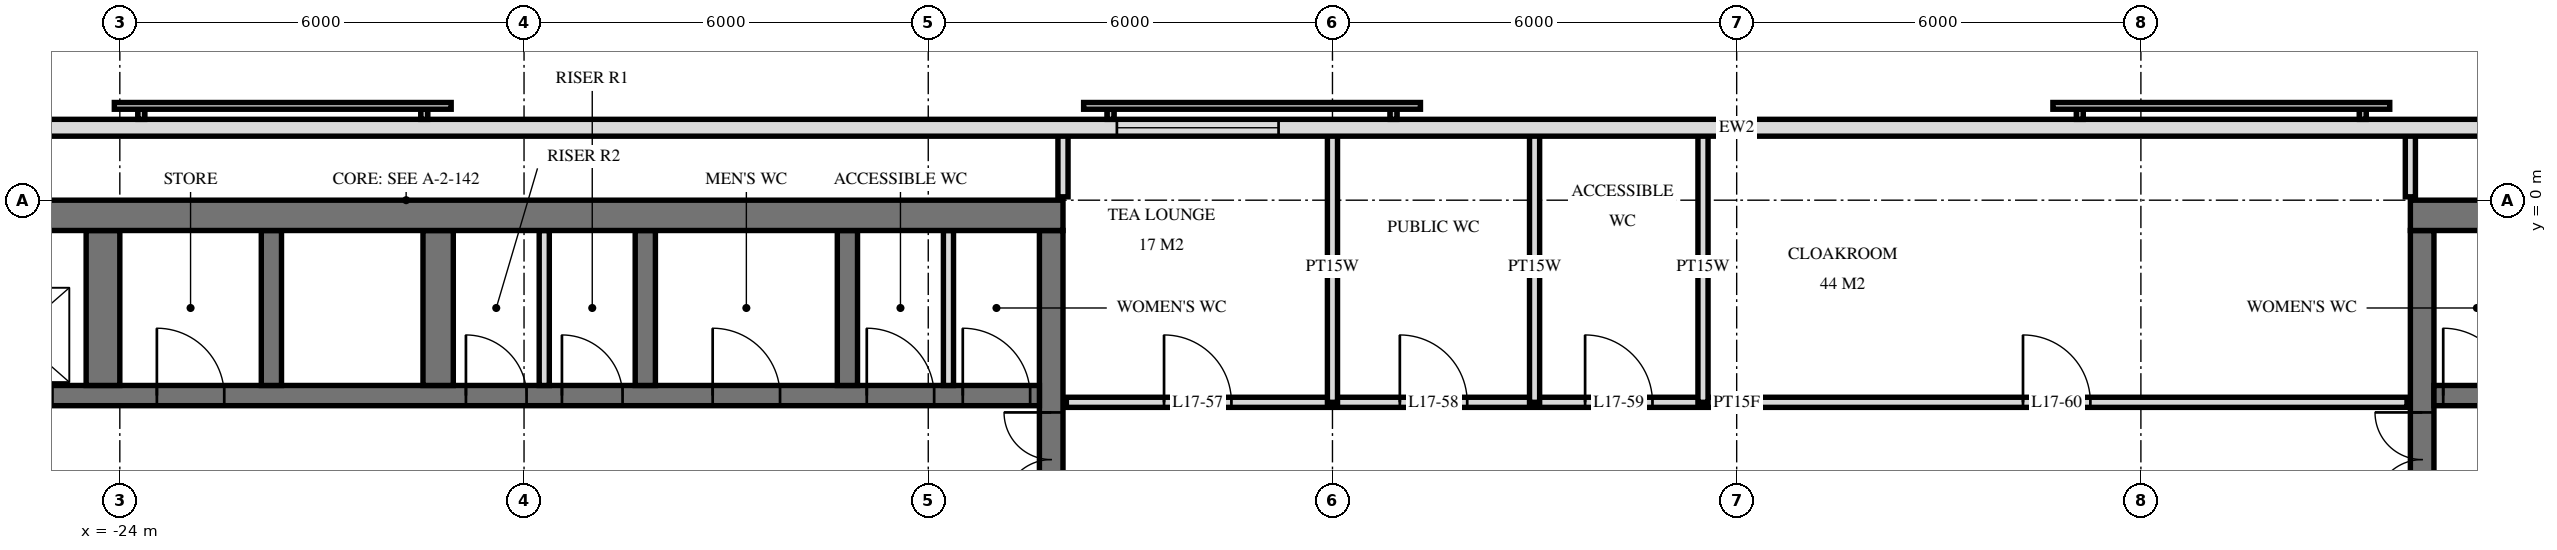
"""IFC4 building model, lengths in metres.
Left out: names, types, materials, properties, quantities, classifications, styles, units other than length and angle.
Written with IfcOpenShell. Run it as: python <this file> out.ifc"""

import sys

from ifc_helpers import new_model, si_unit, direction, frame, frame_2d, origin, place, context, subcontext, project, spatial, rectangle, extrude, element, fill, save


model = new_model("IFC4")
c1 = context("Model", 3, precision=1e-05, world=origin(), true_north=direction((0.0, 1.0)))
c2 = subcontext(c1, "Body", "Model", "MODEL_VIEW")
j1 = project(units=[si_unit("LENGTHUNIT", "METRE"), si_unit("PLANEANGLEUNIT", "RADIAN")], contexts=[c1])
p1 = place(None, origin())
s1 = spatial("IfcSite", under=j1, at=p1, CompositionType="ELEMENT")
p2 = place(p1, origin())
s2 = spatial("IfcBuilding", under=s1, at=p2, CompositionType="ELEMENT")
p3 = place(p2, frame((0.0, 0.0, 70.8)))
s3 = spatial("IfcBuildingStorey", under=s2, at=p3, CompositionType="ELEMENT", Elevation=70.8)
p4 = place(p3, frame((-29.5, -0.225, 0.0), z_axis=(0.0, 0.0, 1.0), x_axis=(1.0, 0.0, 0.0)))
e1 = element("IfcWall", 1, at=p4, inside=s3, PredefinedType="SHEAR", context=c2, shape_type="SweptSolid", body=[
    extrude(rectangle(XDim=19.5, YDim=0.45, at=frame_2d((9.75, 0.0))), origin(), (0.0, 0.0, 1.0), 3.6),
])
p5 = place(p3, frame((-10.175, -14.55, 0.0), z_axis=(0.0, 0.0, 1.0), x_axis=(0.0, 1.0, 0.0)))
e2 = element("IfcWall", 2, at=p5, inside=s3, PredefinedType="SHEAR", context=c2, shape_type="SweptSolid", body=[
    extrude(rectangle(XDim=14.1, YDim=0.35, at=frame_2d((7.05, 0.0))), origin(), (0.0, 0.0, 1.0), 3.6),
])
p6 = place(p5, frame((8.4, 0.0, 0.0)))
e3 = element("IfcOpeningElement", 3, at=p6, cuts=e2, PredefinedType="OPENING", context=c2, shape_type="SweptSolid", body=[
    extrude(rectangle(XDim=1.4, YDim=2.4, at=frame_2d((0.7, 1.2))), frame((0.0, 0.185, 0.0), z_axis=(0.0, -1.0, 0.0), x_axis=(1.0, 0.0, 0.0)), (0.0, 0.0, 1.0), 0.37),
])
p7 = place(p5, frame((10.0, 0.0, 0.0)))
e4 = element("IfcOpeningElement", 4, at=p7, cuts=e2, PredefinedType="OPENING", context=c2, shape_type="SweptSolid", body=[
    extrude(rectangle(XDim=1.4, YDim=2.4, at=frame_2d((0.7, 1.2))), frame((0.0, 0.185, 0.0), z_axis=(0.0, -1.0, 0.0), x_axis=(1.0, 0.0, 0.0)), (0.0, 0.0, 1.0), 0.37),
])
p8 = place(p5, frame((4.0, 0.0, 0.0)))
e5 = element("IfcOpeningElement", 5, at=p8, cuts=e2, PredefinedType="OPENING", context=c2, shape_type="SweptSolid", body=[
    extrude(rectangle(XDim=1.2, YDim=2.1, at=frame_2d((0.6, 1.05))), frame((0.0, 0.185, 0.0), z_axis=(0.0, -1.0, 0.0), x_axis=(1.0, 0.0, 0.0)), (0.0, 0.0, 1.0), 0.37),
])
p9 = place(p3, frame((-29.05, -2.9, 0.0), z_axis=(0.0, 0.0, 1.0), x_axis=(1.0, 0.0, 0.0)))
e6 = element("IfcWall", 6, at=p9, inside=s3, PredefinedType="SHEAR", context=c2, shape_type="SweptSolid", body=[
    extrude(rectangle(XDim=18.7, YDim=0.3, at=frame_2d((9.35, 0.0))), origin(), (0.0, 0.0, 1.0), 3.6),
])
p10 = place(p9, frame((2.95, 0.0, 0.0)))
e7 = element("IfcOpeningElement", 7, at=p10, cuts=e6, PredefinedType="OPENING", context=c2, shape_type="SweptSolid", body=[
    extrude(rectangle(XDim=1.1, YDim=2.1, at=frame_2d((0.55, 1.05))), frame((0.0, 0.16, 0.0), z_axis=(0.0, -1.0, 0.0), x_axis=(1.0, 0.0, 0.0)), (0.0, 0.0, 1.0), 0.32),
])
p11 = place(p9, frame((0.55, 0.0, 0.0)))
e8 = element("IfcOpeningElement", 8, at=p11, cuts=e6, PredefinedType="OPENING", context=c2, shape_type="SweptSolid", body=[
    extrude(rectangle(XDim=1.1, YDim=2.1, at=frame_2d((0.55, 1.05))), frame((0.0, 0.16, 0.0), z_axis=(0.0, -1.0, 0.0), x_axis=(1.0, 0.0, 0.0)), (0.0, 0.0, 1.0), 0.32),
])
p12 = place(p9, frame((11.613, 0.0, 0.0)))
e9 = element("IfcOpeningElement", 9, at=p12, cuts=e6, PredefinedType="OPENING", context=c2, shape_type="SweptSolid", body=[
    extrude(rectangle(XDim=0.9, YDim=2.1, at=frame_2d((0.45, 1.05))), frame((0.0, 0.16, 0.0), z_axis=(0.0, -1.0, 0.0), x_axis=(1.0, 0.0, 0.0)), (0.0, 0.0, 1.0), 0.32),
])
p13 = place(p9, frame((10.188, 0.0, 0.0)))
e10 = element("IfcOpeningElement", 10, at=p13, cuts=e6, PredefinedType="OPENING", context=c2, shape_type="SweptSolid", body=[
    extrude(rectangle(XDim=0.9, YDim=2.1, at=frame_2d((0.45, 1.05))), frame((0.0, 0.16, 0.0), z_axis=(0.0, -1.0, 0.0), x_axis=(1.0, 0.0, 0.0)), (0.0, 0.0, 1.0), 0.32),
])
p14 = place(p9, frame((17.562, 0.0, 0.0)))
e11 = element("IfcOpeningElement", 11, at=p14, cuts=e6, PredefinedType="OPENING", context=c2, shape_type="SweptSolid", body=[
    extrude(rectangle(XDim=1.0, YDim=2.1, at=frame_2d((0.5, 1.05))), frame((0.0, 0.16, 0.0), z_axis=(0.0, -1.0, 0.0), x_axis=(1.0, 0.0, 0.0)), (0.0, 0.0, 1.0), 0.32),
])
p15 = place(p9, frame((16.137, 0.0, 0.0)))
e12 = element("IfcOpeningElement", 12, at=p15, cuts=e6, PredefinedType="OPENING", context=c2, shape_type="SweptSolid", body=[
    extrude(rectangle(XDim=1.0, YDim=2.1, at=frame_2d((0.5, 1.05))), frame((0.0, 0.16, 0.0), z_axis=(0.0, -1.0, 0.0), x_axis=(1.0, 0.0, 0.0)), (0.0, 0.0, 1.0), 0.32),
])
p16 = place(p9, frame((13.85, 0.0, 0.0)))
e13 = element("IfcOpeningElement", 13, at=p16, cuts=e6, PredefinedType="OPENING", context=c2, shape_type="SweptSolid", body=[
    extrude(rectangle(XDim=1.0, YDim=2.1, at=frame_2d((0.5, 1.05))), frame((0.0, 0.16, 0.0), z_axis=(0.0, -1.0, 0.0), x_axis=(1.0, 0.0, 0.0)), (0.0, 0.0, 1.0), 0.32),
])
p17 = place(p9, frame((5.6, 0.0, 0.0)))
e14 = element("IfcOpeningElement", 14, at=p17, cuts=e6, PredefinedType="OPENING", context=c2, shape_type="SweptSolid", body=[
    extrude(rectangle(XDim=1.0, YDim=2.1, at=frame_2d((0.5, 1.05))), frame((0.0, 0.16, 0.0), z_axis=(0.0, -1.0, 0.0), x_axis=(1.0, 0.0, 0.0)), (0.0, 0.0, 1.0), 0.32),
])
for number, where, z_axis, x_axis in (
    (15, (-13.2, -2.75, 0.0), (0.0, 0.0, 1.0), (0.0, 1.0, 0.0)),
    (16, (-16.2, -2.75, 0.0), (0.0, 0.0, 1.0), (0.0, 1.0, 0.0)),
):
    element("IfcWall", number, at=place(p3, frame(where, z_axis=z_axis, x_axis=x_axis)), inside=s3, PredefinedType="SHEAR", context=c2, shape_type="SweptSolid", body=[
        extrude(rectangle(XDim=2.3, YDim=0.3, at=frame_2d((1.15, 0.0))), origin(), (0.0, 0.0, 1.0), 3.6),
    ])
p18 = place(p3, frame((-19.275, -2.75, 0.0), z_axis=(0.0, 0.0, 1.0), x_axis=(0.0, 1.0, 0.0)))
e17 = element("IfcWall", 17, at=p18, inside=s3, PredefinedType="SHEAR", context=c2, shape_type="SweptSolid", body=[
    extrude(rectangle(XDim=2.3, YDim=0.45, at=frame_2d((1.15, 0.0))), origin(), (0.0, 0.0, 1.0), 3.6),
])
p19 = place(p3, frame((-21.75, -2.75, 0.0), z_axis=(0.0, 0.0, 1.0), x_axis=(0.0, 1.0, 0.0)))
e18 = element("IfcWall", 18, at=p19, inside=s3, PredefinedType="SHEAR", context=c2, shape_type="SweptSolid", body=[
    extrude(rectangle(XDim=2.3, YDim=0.3, at=frame_2d((1.15, 0.0))), origin(), (0.0, 0.0, 1.0), 3.6),
])
p20 = place(p3, frame((-24.25, -2.75, 0.0), z_axis=(0.0, 0.0, 1.0), x_axis=(0.0, 1.0, 0.0)))
e19 = element("IfcWall", 19, at=p20, inside=s3, PredefinedType="SHEAR", context=c2, shape_type="SweptSolid", body=[
    extrude(rectangle(XDim=2.3, YDim=0.5, at=frame_2d((1.15, 0.0))), origin(), (0.0, 0.0, 1.0), 3.6),
])
p21 = place(p3, frame((10.0, -0.225, 0.0), z_axis=(0.0, 0.0, 1.0), x_axis=(1.0, 0.0, 0.0)))
e20 = element("IfcWall", 20, at=p21, inside=s3, PredefinedType="SHEAR", context=c2, shape_type="SweptSolid", body=[
    extrude(rectangle(XDim=19.5, YDim=0.45, at=frame_2d((9.75, 0.0))), origin(), (0.0, 0.0, 1.0), 3.6),
])
p22 = place(p3, frame((10.175, -14.55, 0.0), z_axis=(0.0, 0.0, 1.0), x_axis=(0.0, 1.0, 0.0)))
e21 = element("IfcWall", 21, at=p22, inside=s3, PredefinedType="SHEAR", context=c2, shape_type="SweptSolid", body=[
    extrude(rectangle(XDim=14.1, YDim=0.35, at=frame_2d((7.05, 0.0))), origin(), (0.0, 0.0, 1.0), 3.6),
])
p23 = place(p22, frame((8.4, 0.0, 0.0)))
e22 = element("IfcOpeningElement", 22, at=p23, cuts=e21, PredefinedType="OPENING", context=c2, shape_type="SweptSolid", body=[
    extrude(rectangle(XDim=1.4, YDim=2.4, at=frame_2d((0.7, 1.2))), frame((0.0, 0.185, 0.0), z_axis=(0.0, -1.0, 0.0), x_axis=(1.0, 0.0, 0.0)), (0.0, 0.0, 1.0), 0.37),
])
p24 = place(p22, frame((10.0, 0.0, 0.0)))
e23 = element("IfcOpeningElement", 23, at=p24, cuts=e21, PredefinedType="OPENING", context=c2, shape_type="SweptSolid", body=[
    extrude(rectangle(XDim=1.4, YDim=2.4, at=frame_2d((0.7, 1.2))), frame((0.0, 0.185, 0.0), z_axis=(0.0, -1.0, 0.0), x_axis=(1.0, 0.0, 0.0)), (0.0, 0.0, 1.0), 0.37),
])
p25 = place(p22, frame((4.0, 0.0, 0.0)))
e24 = element("IfcOpeningElement", 24, at=p25, cuts=e21, PredefinedType="OPENING", context=c2, shape_type="SweptSolid", body=[
    extrude(rectangle(XDim=1.2, YDim=2.1, at=frame_2d((0.6, 1.05))), frame((0.0, 0.185, 0.0), z_axis=(0.0, -1.0, 0.0), x_axis=(1.0, 0.0, 0.0)), (0.0, 0.0, 1.0), 0.37),
])
p26 = place(p3, frame((10.35, -2.9, 0.0), z_axis=(0.0, 0.0, 1.0), x_axis=(1.0, 0.0, 0.0)))
e25 = element("IfcWall", 25, at=p26, inside=s3, PredefinedType="SHEAR", context=c2, shape_type="SweptSolid", body=[
    extrude(rectangle(XDim=18.7, YDim=0.3, at=frame_2d((9.35, 0.0))), origin(), (0.0, 0.0, 1.0), 3.6),
])
p27 = place(p26, frame((14.65, 0.0, 0.0)))
e26 = element("IfcOpeningElement", 26, at=p27, cuts=e25, PredefinedType="OPENING", context=c2, shape_type="SweptSolid", body=[
    extrude(rectangle(XDim=1.1, YDim=2.1, at=frame_2d((0.55, 1.05))), frame((0.0, 0.16, 0.0), z_axis=(0.0, -1.0, 0.0), x_axis=(1.0, 0.0, 0.0)), (0.0, 0.0, 1.0), 0.32),
])
p28 = place(p26, frame((17.05, 0.0, 0.0)))
e27 = element("IfcOpeningElement", 27, at=p28, cuts=e25, PredefinedType="OPENING", context=c2, shape_type="SweptSolid", body=[
    extrude(rectangle(XDim=1.1, YDim=2.1, at=frame_2d((0.55, 1.05))), frame((0.0, 0.16, 0.0), z_axis=(0.0, -1.0, 0.0), x_axis=(1.0, 0.0, 0.0)), (0.0, 0.0, 1.0), 0.32),
])
p29 = place(p26, frame((6.188, 0.0, 0.0)))
e28 = element("IfcOpeningElement", 28, at=p29, cuts=e25, PredefinedType="OPENING", context=c2, shape_type="SweptSolid", body=[
    extrude(rectangle(XDim=0.9, YDim=2.1, at=frame_2d((0.45, 1.05))), frame((0.0, 0.16, 0.0), z_axis=(0.0, -1.0, 0.0), x_axis=(1.0, 0.0, 0.0)), (0.0, 0.0, 1.0), 0.32),
])
p30 = place(p26, frame((7.613, 0.0, 0.0)))
e29 = element("IfcOpeningElement", 29, at=p30, cuts=e25, PredefinedType="OPENING", context=c2, shape_type="SweptSolid", body=[
    extrude(rectangle(XDim=0.9, YDim=2.1, at=frame_2d((0.45, 1.05))), frame((0.0, 0.16, 0.0), z_axis=(0.0, -1.0, 0.0), x_axis=(1.0, 0.0, 0.0)), (0.0, 0.0, 1.0), 0.32),
])
p31 = place(p26, frame((0.137, 0.0, 0.0)))
e30 = element("IfcOpeningElement", 30, at=p31, cuts=e25, PredefinedType="OPENING", context=c2, shape_type="SweptSolid", body=[
    extrude(rectangle(XDim=1.0, YDim=2.1, at=frame_2d((0.5, 1.05))), frame((0.0, 0.16, 0.0), z_axis=(0.0, -1.0, 0.0), x_axis=(1.0, 0.0, 0.0)), (0.0, 0.0, 1.0), 0.32),
])
p32 = place(p26, frame((1.562, 0.0, 0.0)))
e31 = element("IfcOpeningElement", 31, at=p32, cuts=e25, PredefinedType="OPENING", context=c2, shape_type="SweptSolid", body=[
    extrude(rectangle(XDim=1.0, YDim=2.1, at=frame_2d((0.5, 1.05))), frame((0.0, 0.16, 0.0), z_axis=(0.0, -1.0, 0.0), x_axis=(1.0, 0.0, 0.0)), (0.0, 0.0, 1.0), 0.32),
])
p33 = place(p26, frame((3.85, 0.0, 0.0)))
e32 = element("IfcOpeningElement", 32, at=p33, cuts=e25, PredefinedType="OPENING", context=c2, shape_type="SweptSolid", body=[
    extrude(rectangle(XDim=1.0, YDim=2.1, at=frame_2d((0.5, 1.05))), frame((0.0, 0.16, 0.0), z_axis=(0.0, -1.0, 0.0), x_axis=(1.0, 0.0, 0.0)), (0.0, 0.0, 1.0), 0.32),
])
p34 = place(p26, frame((12.1, 0.0, 0.0)))
e33 = element("IfcOpeningElement", 33, at=p34, cuts=e25, PredefinedType="OPENING", context=c2, shape_type="SweptSolid", body=[
    extrude(rectangle(XDim=1.0, YDim=2.1, at=frame_2d((0.5, 1.05))), frame((0.0, 0.16, 0.0), z_axis=(0.0, -1.0, 0.0), x_axis=(1.0, 0.0, 0.0)), (0.0, 0.0, 1.0), 0.32),
])
p35 = place(p3, frame((28.775, 1.075, 0.0), z_axis=(0.0, 0.0, 1.0), x_axis=(-1.0, 0.0, 0.0)))
e34 = element("IfcWall", 34, at=p35, inside=s3, PredefinedType="SOLIDWALL", context=c2, shape_type="SweptSolid", body=[
    extrude(rectangle(XDim=57.551, YDim=0.25, at=frame_2d((28.775, 0.0))), origin(), (0.0, 0.0, 1.0), 3.32),
])
p36 = place(p35, frame((35.575, 0.0, 0.3)))
e35 = element("IfcOpeningElement", 35, at=p36, cuts=e34, PredefinedType="OPENING", context=c2, shape_type="SweptSolid", body=[
    extrude(rectangle(XDim=2.4, YDim=2.1, at=frame_2d((1.2, 1.05))), frame((0.0, 0.135, 0.0), z_axis=(0.0, -1.0, 0.0), x_axis=(1.0, 0.0, 0.0)), (0.0, 0.0, 1.0), 0.27),
])
for number, where, z_axis, x_axis in (
    (36, (-17.7, -2.75, 0.0), (0.0, 0.0, 1.0), (0.0, 1.0, 0.0)),
    (37, (-11.7, -2.75, 0.0), (0.0, 0.0, 1.0), (0.0, 1.0, 0.0)),
):
    element("IfcWall", number, at=place(p3, frame(where, z_axis=z_axis, x_axis=x_axis)), inside=s3, PredefinedType="PARTITIONING", context=c2, shape_type="SweptSolid", body=[
        extrude(rectangle(XDim=2.3, YDim=0.15, at=frame_2d((1.15, 0.0))), origin(), (0.0, 0.0, 1.0), 3.3),
    ])
p37 = place(p3, frame((10.0, 0.05, 0.0), z_axis=(0.0, 0.0, 1.0), x_axis=(0.0, 1.0, 0.0)))
e38 = element("IfcWall", 38, at=p37, inside=s3, PredefinedType="PARTITIONING", context=c2, shape_type="SweptSolid", body=[
    extrude(rectangle(XDim=0.97, YDim=0.15, at=frame_2d((0.485, 0.0))), origin(), (0.0, 0.0, 1.0), 3.32),
])
for number, where, z_axis, x_axis in (
    (39, (-0.5, -3.0, 0.0), (0.0, 0.0, 1.0), (0.0, 1.0, 0.0)),
    (40, (-3.0, -3.0, 0.0), (0.0, 0.0, 1.0), (0.0, 1.0, 0.0)),
    (41, (-6.0, -3.0, 0.0), (0.0, 0.0, 1.0), (0.0, 1.0, 0.0)),
):
    element("IfcWall", number, at=place(p3, frame(where, z_axis=z_axis, x_axis=x_axis)), inside=s3, PredefinedType="PLUMBINGWALL", context=c2, shape_type="SweptSolid", body=[
        extrude(rectangle(XDim=4.02, YDim=0.15, at=frame_2d((2.01, 0.0))), origin(), (0.0, 0.0, 1.0), 3.32),
    ])
p38 = place(p3, frame((-10.0, 0.05, 0.0), z_axis=(0.0, 0.0, 1.0), x_axis=(0.0, 1.0, 0.0)))
e42 = element("IfcWall", 42, at=p38, inside=s3, PredefinedType="PARTITIONING", context=c2, shape_type="SweptSolid", body=[
    extrude(rectangle(XDim=0.97, YDim=0.15, at=frame_2d((0.485, 0.0))), origin(), (0.0, 0.0, 1.0), 3.32),
])
p39 = place(p3, frame((-9.95, -3.0, 0.0), z_axis=(0.0, 0.0, 1.0), x_axis=(1.0, 0.0, 0.0)))
e43 = element("IfcWall", 43, at=p39, inside=s3, PredefinedType="PARTITIONING", context=c2, shape_type="SweptSolid", body=[
    extrude(rectangle(XDim=19.9, YDim=0.15, at=frame_2d((9.95, 0.0))), origin(), (0.0, 0.0, 1.0), 3.32),
])
p40 = place(p39, frame((1.45, 0.0, 0.0)))
e44 = element("IfcOpeningElement", 44, at=p40, cuts=e43, PredefinedType="OPENING", context=c2, shape_type="SweptSolid", body=[
    extrude(rectangle(XDim=1.0, YDim=2.1, at=frame_2d((0.5, 1.05))), frame((0.0, 0.085, 0.0), z_axis=(0.0, -1.0, 0.0), x_axis=(1.0, 0.0, 0.0)), (0.0, 0.0, 1.0), 0.17),
])
p41 = place(p39, frame((4.95, 0.0, 0.0)))
e45 = element("IfcOpeningElement", 45, at=p41, cuts=e43, PredefinedType="OPENING", context=c2, shape_type="SweptSolid", body=[
    extrude(rectangle(XDim=1.0, YDim=2.1, at=frame_2d((0.5, 1.05))), frame((0.0, 0.085, 0.0), z_axis=(0.0, -1.0, 0.0), x_axis=(1.0, 0.0, 0.0)), (0.0, 0.0, 1.0), 0.17),
])
p42 = place(p39, frame((7.7, 0.0, 0.0)))
e46 = element("IfcOpeningElement", 46, at=p42, cuts=e43, PredefinedType="OPENING", context=c2, shape_type="SweptSolid", body=[
    extrude(rectangle(XDim=1.0, YDim=2.1, at=frame_2d((0.5, 1.05))), frame((0.0, 0.085, 0.0), z_axis=(0.0, -1.0, 0.0), x_axis=(1.0, 0.0, 0.0)), (0.0, 0.0, 1.0), 0.17),
])
p43 = place(p39, frame((14.2, 0.0, 0.0)))
e47 = element("IfcOpeningElement", 47, at=p43, cuts=e43, PredefinedType="OPENING", context=c2, shape_type="SweptSolid", body=[
    extrude(rectangle(XDim=1.0, YDim=2.1, at=frame_2d((0.5, 1.05))), frame((0.0, 0.085, 0.0), z_axis=(0.0, -1.0, 0.0), x_axis=(1.0, 0.0, 0.0)), (0.0, 0.0, 1.0), 0.17),
])
p44 = place(p36, origin())
e48 = element("IfcWindow", 48, at=p44, inside=s3, PartitioningType="SINGLE_PANEL", PredefinedType="WINDOW", context=c2, shape_type="SweptSolid", body=[
    extrude(rectangle(XDim=2.4, YDim=2.1, at=frame_2d((1.2, 1.05))), frame((0.0, 0.03, 0.0), z_axis=(0.0, -1.0, 0.0), x_axis=(1.0, 0.0, 0.0)), (0.0, 0.0, 1.0), 0.06),
])
fill(e35, e48)
p45 = place(p7, origin())
e49 = element("IfcDoor", 49, at=p45, inside=s3, OperationType="DOUBLE_DOOR_SINGLE_SWING", PredefinedType="DOOR", context=c2, shape_type="SweptSolid", body=[
    extrude(rectangle(XDim=1.4, YDim=2.4, at=frame_2d((0.7, 1.2))), frame((0.0, 0.025, 0.0), z_axis=(0.0, -1.0, 0.0), x_axis=(1.0, 0.0, 0.0)), (0.0, 0.0, 1.0), 0.05),
])
fill(e4, e49)
p46 = place(p12, origin())
e50 = element("IfcDoor", 50, at=p46, inside=s3, OperationType="SINGLE_SWING_RIGHT", PredefinedType="DOOR", context=c2, shape_type="SweptSolid", body=[
    extrude(rectangle(XDim=0.9, YDim=2.1, at=frame_2d((0.45, 1.05))), frame((0.0, 0.025, 0.0), z_axis=(0.0, -1.0, 0.0), x_axis=(1.0, 0.0, 0.0)), (0.0, 0.0, 1.0), 0.05),
])
fill(e9, e50)
p47 = place(p13, origin())
e51 = element("IfcDoor", 51, at=p47, inside=s3, OperationType="SINGLE_SWING_RIGHT", PredefinedType="DOOR", context=c2, shape_type="SweptSolid", body=[
    extrude(rectangle(XDim=0.9, YDim=2.1, at=frame_2d((0.45, 1.05))), frame((0.0, 0.025, 0.0), z_axis=(0.0, -1.0, 0.0), x_axis=(1.0, 0.0, 0.0)), (0.0, 0.0, 1.0), 0.05),
])
fill(e10, e51)
p48 = place(p14, origin())
e52 = element("IfcDoor", 52, at=p48, inside=s3, OperationType="SINGLE_SWING_RIGHT", PredefinedType="DOOR", context=c2, shape_type="SweptSolid", body=[
    extrude(rectangle(XDim=1.0, YDim=2.1, at=frame_2d((0.5, 1.05))), frame((0.0, 0.025, 0.0), z_axis=(0.0, -1.0, 0.0), x_axis=(1.0, 0.0, 0.0)), (0.0, 0.0, 1.0), 0.05),
])
fill(e11, e52)
p49 = place(p15, origin())
e53 = element("IfcDoor", 53, at=p49, inside=s3, OperationType="SINGLE_SWING_RIGHT", PredefinedType="DOOR", context=c2, shape_type="SweptSolid", body=[
    extrude(rectangle(XDim=1.0, YDim=2.1, at=frame_2d((0.5, 1.05))), frame((0.0, 0.025, 0.0), z_axis=(0.0, -1.0, 0.0), x_axis=(1.0, 0.0, 0.0)), (0.0, 0.0, 1.0), 0.05),
])
fill(e12, e53)
p50 = place(p16, origin())
e54 = element("IfcDoor", 54, at=p50, inside=s3, OperationType="SINGLE_SWING_RIGHT", PredefinedType="DOOR", context=c2, shape_type="SweptSolid", body=[
    extrude(rectangle(XDim=1.0, YDim=2.1, at=frame_2d((0.5, 1.05))), frame((0.0, 0.025, 0.0), z_axis=(0.0, -1.0, 0.0), x_axis=(1.0, 0.0, 0.0)), (0.0, 0.0, 1.0), 0.05),
])
fill(e13, e54)
p51 = place(p17, origin())
e55 = element("IfcDoor", 55, at=p51, inside=s3, OperationType="SINGLE_SWING_RIGHT", PredefinedType="DOOR", context=c2, shape_type="SweptSolid", body=[
    extrude(rectangle(XDim=1.0, YDim=2.1, at=frame_2d((0.5, 1.05))), frame((0.0, 0.025, 0.0), z_axis=(0.0, -1.0, 0.0), x_axis=(1.0, 0.0, 0.0)), (0.0, 0.0, 1.0), 0.05),
])
fill(e14, e55)
p52 = place(p24, origin())
e56 = element("IfcDoor", 56, at=p52, inside=s3, OperationType="DOUBLE_DOOR_SINGLE_SWING", PredefinedType="DOOR", context=c2, shape_type="SweptSolid", body=[
    extrude(rectangle(XDim=1.4, YDim=2.4, at=frame_2d((0.7, 1.2))), frame((0.0, 0.025, 0.0), z_axis=(0.0, -1.0, 0.0), x_axis=(1.0, 0.0, 0.0)), (0.0, 0.0, 1.0), 0.05),
])
fill(e23, e56)
p53 = place(p31, origin())
e57 = element("IfcDoor", 57, at=p53, inside=s3, OperationType="SINGLE_SWING_RIGHT", PredefinedType="DOOR", context=c2, shape_type="SweptSolid", body=[
    extrude(rectangle(XDim=1.0, YDim=2.1, at=frame_2d((0.5, 1.05))), frame((0.0, 0.025, 0.0), z_axis=(0.0, -1.0, 0.0), x_axis=(1.0, 0.0, 0.0)), (0.0, 0.0, 1.0), 0.05),
])
fill(e30, e57)
p54 = place(p40, origin())
e58 = element("IfcDoor", 58, at=p54, inside=s3, OperationType="SINGLE_SWING_RIGHT", PredefinedType="DOOR", context=c2, shape_type="SweptSolid", body=[
    extrude(rectangle(XDim=1.0, YDim=2.1, at=frame_2d((0.5, 1.05))), frame((0.0, 0.025, 0.0), z_axis=(0.0, -1.0, 0.0), x_axis=(1.0, 0.0, 0.0)), (0.0, 0.0, 1.0), 0.05),
])
fill(e44, e58)
p55 = place(p41, origin())
e59 = element("IfcDoor", 59, at=p55, inside=s3, OperationType="SINGLE_SWING_RIGHT", PredefinedType="DOOR", context=c2, shape_type="SweptSolid", body=[
    extrude(rectangle(XDim=1.0, YDim=2.1, at=frame_2d((0.5, 1.05))), frame((0.0, 0.025, 0.0), z_axis=(0.0, -1.0, 0.0), x_axis=(1.0, 0.0, 0.0)), (0.0, 0.0, 1.0), 0.05),
])
fill(e45, e59)
p56 = place(p42, origin())
e60 = element("IfcDoor", 60, at=p56, inside=s3, OperationType="SINGLE_SWING_RIGHT", PredefinedType="DOOR", context=c2, shape_type="SweptSolid", body=[
    extrude(rectangle(XDim=1.0, YDim=2.1, at=frame_2d((0.5, 1.05))), frame((0.0, 0.025, 0.0), z_axis=(0.0, -1.0, 0.0), x_axis=(1.0, 0.0, 0.0)), (0.0, 0.0, 1.0), 0.05),
])
fill(e46, e60)
p57 = place(p43, origin())
e61 = element("IfcDoor", 61, at=p57, inside=s3, OperationType="SINGLE_SWING_RIGHT", PredefinedType="DOOR", context=c2, shape_type="SweptSolid", body=[
    extrude(rectangle(XDim=1.0, YDim=2.1, at=frame_2d((0.5, 1.05))), frame((0.0, 0.025, 0.0), z_axis=(0.0, -1.0, 0.0), x_axis=(1.0, 0.0, 0.0)), (0.0, 0.0, 1.0), 0.05),
])
fill(e47, e61)
save(model, sys.argv[1])
